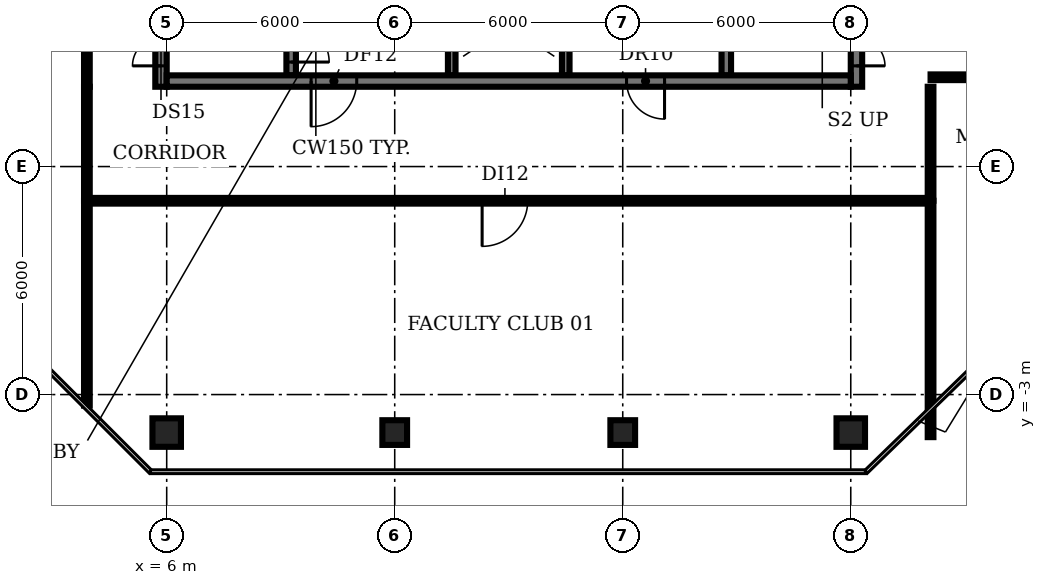
"""IFC4 building model, lengths in metres.
Left out: names, types, materials, properties, quantities, classifications, styles, units other than length and angle.
Written with IfcOpenShell. Run it as: python <this file> out.ifc"""

import sys

from ifc_helpers import new_model, si_unit, direction, frame, frame_2d, origin, origin_2d, place, context, subcontext, project, spatial, rectangle, circle, extrude, element, fill, save


model = new_model("IFC4")
c1 = context("Model", 3, precision=1e-05, world=origin(), true_north=direction((0.0, 1.0)))
c2 = subcontext(c1, "Body", "Model", "MODEL_VIEW")
j1 = project(units=[si_unit("LENGTHUNIT", "METRE"), si_unit("PLANEANGLEUNIT", "RADIAN")], contexts=[c1])
p1 = place(None, origin())
s1 = spatial("IfcSite", under=j1, at=p1, CompositionType="ELEMENT")
p2 = place(p1, origin())
s2 = spatial("IfcBuilding", under=s1, at=p2, CompositionType="ELEMENT")
p3 = place(p2, frame((0.0, 0.0, 314.6)))
s3 = spatial("IfcBuildingStorey", under=s2, at=p3, CompositionType="ELEMENT", Elevation=314.6)
p4 = place(p3, frame((6.0, -4.0, 0.0), z_axis=(0.0, 0.0, 1.0), x_axis=(1.0, 0.0, 0.0)))
e1 = element("IfcColumn", 1, at=p4, inside=s3, PredefinedType="COLUMN", context=c2, shape_type="SweptSolid", body=[
    extrude(circle(Radius=0.375, at=origin_2d()), origin(), (0.0, 0.0, 1.0), 3.9),
])
for number, where, z_axis, x_axis in (
    (2, (12.0, -4.0, 0.0), (0.0, 0.0, 1.0), (1.0, 0.0, 0.0)),
    (3, (18.0, -4.0, 0.0), (0.0, 0.0, 1.0), (1.0, 0.0, 0.0)),
):
    element("IfcColumn", number, at=place(p3, frame(where, z_axis=z_axis, x_axis=x_axis)), inside=s3, PredefinedType="COLUMN", context=c2, shape_type="SweptSolid", body=[
        extrude(rectangle(XDim=0.65, YDim=0.65, at=origin_2d()), origin(), (0.0, 0.0, 1.0), 3.9),
    ])
p5 = place(p3, frame((24.0, -4.0, 0.0), z_axis=(0.0, 0.0, 1.0), x_axis=(1.0, 0.0, 0.0)))
e4 = element("IfcColumn", 4, at=p5, inside=s3, PredefinedType="COLUMN", context=c2, shape_type="SweptSolid", body=[
    extrude(circle(Radius=0.375, at=origin_2d()), origin(), (0.0, 0.0, 1.0), 3.9),
])
p6 = place(p3, frame((9.275, 11.825, 0.0), z_axis=(0.0, 0.0, 1.0), x_axis=(0.0, -1.0, 0.0)))
e5 = element("IfcWall", 5, at=p6, inside=s3, PredefinedType="SHEAR", context=c2, shape_type="SweptSolid", body=[
    extrude(rectangle(XDim=6.425, YDim=0.25, at=frame_2d((3.212, 0.0))), origin(), (0.0, 0.0, 1.0), 3.9),
])
p7 = place(p6, frame((5.075, 0.0, 0.0)))
e6 = element("IfcOpeningElement", 6, at=p7, cuts=e5, PredefinedType="OPENING", context=c2, shape_type="SweptSolid", body=[
    extrude(rectangle(XDim=1.0, YDim=2.1, at=frame_2d((0.5, 1.05))), frame((0.0, 0.135, 0.0), z_axis=(0.0, -1.0, 0.0), x_axis=(1.0, 0.0, 0.0)), (0.0, 0.0, 1.0), 0.27),
])
p8 = place(p3, frame((13.5, 5.4, 0.0), z_axis=(0.0, 0.0, 1.0), x_axis=(0.0, 1.0, 0.0)))
e7 = element("IfcWall", 7, at=p8, inside=s3, PredefinedType="SHEAR", context=c2, shape_type="SweptSolid", body=[
    extrude(rectangle(XDim=8.2, YDim=0.2, at=frame_2d((4.1, 0.0))), origin(), (0.0, 0.0, 1.0), 3.9),
])
p9 = place(p8, frame((0.75, 0.0, 0.0)))
e8 = element("IfcOpeningElement", 8, at=p9, cuts=e7, PredefinedType="OPENING", context=c2, shape_type="SweptSolid", body=[
    extrude(rectangle(XDim=1.1, YDim=2.1, at=frame_2d((0.55, 1.05))), frame((0.0, 0.11, 0.0), z_axis=(0.0, -1.0, 0.0), x_axis=(1.0, 0.0, 0.0)), (0.0, 0.0, 1.0), 0.22),
])
p10 = place(p8, frame((3.55, 0.0, 0.0)))
e9 = element("IfcOpeningElement", 9, at=p10, cuts=e7, PredefinedType="OPENING", context=c2, shape_type="SweptSolid", body=[
    extrude(rectangle(XDim=1.1, YDim=2.1, at=frame_2d((0.55, 1.05))), frame((0.0, 0.11, 0.0), z_axis=(0.0, -1.0, 0.0), x_axis=(1.0, 0.0, 0.0)), (0.0, 0.0, 1.0), 0.22),
])
p11 = place(p8, frame((6.35, 0.0, 0.0)))
e10 = element("IfcOpeningElement", 10, at=p11, cuts=e7, PredefinedType="OPENING", context=c2, shape_type="SweptSolid", body=[
    extrude(rectangle(XDim=1.1, YDim=2.1, at=frame_2d((0.55, 1.05))), frame((0.0, 0.11, 0.0), z_axis=(0.0, -1.0, 0.0), x_axis=(1.0, 0.0, 0.0)), (0.0, 0.0, 1.0), 0.22),
])
p12 = place(p3, frame((16.5, 5.4, 0.0), z_axis=(0.0, 0.0, 1.0), x_axis=(0.0, 1.0, 0.0)))
e11 = element("IfcWall", 11, at=p12, inside=s3, PredefinedType="SHEAR", context=c2, shape_type="SweptSolid", body=[
    extrude(rectangle(XDim=8.2, YDim=0.2, at=frame_2d((4.1, 0.0))), origin(), (0.0, 0.0, 1.0), 3.9),
])
p13 = place(p3, frame((20.725, 5.4, 0.0), z_axis=(0.0, 0.0, 1.0), x_axis=(0.0, 1.0, 0.0)))
e12 = element("IfcWall", 12, at=p13, inside=s3, PredefinedType="SHEAR", context=c2, shape_type="SweptSolid", body=[
    extrude(rectangle(XDim=6.3, YDim=0.25, at=frame_2d((3.15, 0.0))), origin(), (0.0, 0.0, 1.0), 3.9),
])
p14 = place(p3, frame((5.85, 5.1, 0.0), z_axis=(0.0, 0.0, 1.0), x_axis=(0.0, 1.0, 0.0)))
e13 = element("IfcWall", 13, at=p14, inside=s3, PredefinedType="SHEAR", context=c2, shape_type="SweptSolid", body=[
    extrude(rectangle(XDim=20.0, YDim=0.3, at=frame_2d((10.0, 0.0))), origin(), (0.0, 0.0, 1.0), 3.9),
])
p15 = place(p14, frame((0.55, 0.0, 0.0)))
e14 = element("IfcOpeningElement", 14, at=p15, cuts=e13, PredefinedType="OPENING", context=c2, shape_type="SweptSolid", body=[
    extrude(rectangle(XDim=1.5, YDim=2.1, at=frame_2d((0.75, 1.05))), frame((0.0, 0.16, 0.0), z_axis=(0.0, -1.0, 0.0), x_axis=(1.0, 0.0, 0.0)), (0.0, 0.0, 1.0), 0.32),
])
p16 = place(p14, frame((7.0, 0.0, 0.0)))
e15 = element("IfcOpeningElement", 15, at=p16, cuts=e13, PredefinedType="OPENING", context=c2, shape_type="SweptSolid", body=[
    extrude(rectangle(XDim=1.2, YDim=2.1, at=frame_2d((0.6, 1.05))), frame((0.0, 0.16, 0.0), z_axis=(0.0, -1.0, 0.0), x_axis=(1.0, 0.0, 0.0)), (0.0, 0.0, 1.0), 0.32),
])
p17 = place(p14, frame((13.55, 0.0, 0.0)))
e16 = element("IfcOpeningElement", 16, at=p17, cuts=e13, PredefinedType="OPENING", context=c2, shape_type="SweptSolid", body=[
    extrude(rectangle(XDim=1.2, YDim=2.1, at=frame_2d((0.6, 1.05))), frame((0.0, 0.16, 0.0), z_axis=(0.0, -1.0, 0.0), x_axis=(1.0, 0.0, 0.0)), (0.0, 0.0, 1.0), 0.32),
])
p18 = place(p3, frame((24.15, 25.705, 0.0), z_axis=(0.0, 0.0, 1.0), x_axis=(0.0, -1.0, 0.0)))
e17 = element("IfcWall", 17, at=p18, inside=s3, PredefinedType="SHEAR", context=c2, shape_type="SweptSolid", body=[
    extrude(rectangle(XDim=20.605, YDim=0.3, at=frame_2d((10.302, 0.0))), origin(), (0.0, 0.0, 1.0), 3.9),
])
p19 = place(p18, frame((18.555, 0.0, 0.0)))
e18 = element("IfcOpeningElement", 18, at=p19, cuts=e17, PredefinedType="OPENING", context=c2, shape_type="SweptSolid", body=[
    extrude(rectangle(XDim=1.5, YDim=2.1, at=frame_2d((0.75, 1.05))), frame((0.0, 0.16, 0.0), z_axis=(0.0, -1.0, 0.0), x_axis=(1.0, 0.0, 0.0)), (0.0, 0.0, 1.0), 0.32),
])
p20 = place(p18, frame((12.455, 0.0, 0.0)))
e19 = element("IfcOpeningElement", 19, at=p20, cuts=e17, PredefinedType="OPENING", context=c2, shape_type="SweptSolid", body=[
    extrude(rectangle(XDim=0.9, YDim=2.1, at=frame_2d((0.45, 1.05))), frame((0.0, 0.16, 0.0), z_axis=(0.0, -1.0, 0.0), x_axis=(1.0, 0.0, 0.0)), (0.0, 0.0, 1.0), 0.32),
])
p21 = place(p18, frame((6.455, 0.0, 0.0)))
e20 = element("IfcOpeningElement", 20, at=p21, cuts=e17, PredefinedType="OPENING", context=c2, shape_type="SweptSolid", body=[
    extrude(rectangle(XDim=2.0, YDim=2.1, at=frame_2d((1.0, 1.05))), frame((0.0, 0.16, 0.0), z_axis=(0.0, -1.0, 0.0), x_axis=(1.0, 0.0, 0.0)), (0.0, 0.0, 1.0), 0.32),
])
p22 = place(p3, frame((24.0, 5.25, 0.0), z_axis=(0.0, 0.0, 1.0), x_axis=(-1.0, 0.0, 0.0)))
e21 = element("IfcWall", 21, at=p22, inside=s3, PredefinedType="SHEAR", context=c2, shape_type="SweptSolid", body=[
    extrude(rectangle(XDim=18.0, YDim=0.3, at=frame_2d((9.0, 0.0))), origin(), (0.0, 0.0, 1.0), 3.9),
])
p23 = place(p22, frame((13.0, 0.0, 0.0)))
e22 = element("IfcOpeningElement", 22, at=p23, cuts=e21, PredefinedType="OPENING", context=c2, shape_type="SweptSolid", body=[
    extrude(rectangle(XDim=1.2, YDim=2.1, at=frame_2d((0.6, 1.05))), frame((0.0, 0.16, 0.0), z_axis=(0.0, -1.0, 0.0), x_axis=(1.0, 0.0, 0.0)), (0.0, 0.0, 1.0), 0.32),
])
p24 = place(p22, frame((4.9, 0.0, 0.0)))
e23 = element("IfcOpeningElement", 23, at=p24, cuts=e21, PredefinedType="OPENING", context=c2, shape_type="SweptSolid", body=[
    extrude(rectangle(XDim=1.0, YDim=2.1, at=frame_2d((0.5, 1.05))), frame((0.0, 0.16, 0.0), z_axis=(0.0, -1.0, 0.0), x_axis=(1.0, 0.0, 0.0)), (0.0, 0.0, 1.0), 0.32),
])
p25 = place(p3, frame((3.9, -3.29, 0.0), z_axis=(0.0, 0.0, 1.0), x_axis=(0.0, 1.0, 0.0)))
e24 = element("IfcWall", 24, at=p25, inside=s3, PredefinedType="PARTITIONING", context=c2, shape_type="SweptSolid", body=[
    extrude(rectangle(XDim=5.39, YDim=0.15, at=frame_2d((2.695, 0.0))), origin(), (0.0, 0.0, 1.0), 2.95),
])
p26 = place(p3, frame((3.9, 2.1, 0.0), z_axis=(0.0, 0.0, 1.0), x_axis=(0.0, 1.0, 0.0)))
e25 = element("IfcWall", 25, at=p26, inside=s3, PredefinedType="PARTITIONING", context=c2, shape_type="SweptSolid", body=[
    extrude(rectangle(XDim=3.0, YDim=0.15, at=frame_2d((1.5, 0.0))), origin(), (0.0, 0.0, 1.0), 2.95),
])
p27 = place(p3, frame((3.9, 5.1, 0.0), z_axis=(0.0, 0.0, 1.0), x_axis=(0.0, 1.0, 0.0)))
e26 = element("IfcWall", 26, at=p27, inside=s3, PredefinedType="PARTITIONING", context=c2, shape_type="SweptSolid", body=[
    extrude(rectangle(XDim=13.9, YDim=0.15, at=frame_2d((6.95, 0.0))), origin(), (0.0, 0.0, 1.0), 2.95),
])
p28 = place(p27, frame((6.2, 0.0, 0.0)))
e27 = element("IfcOpeningElement", 27, at=p28, cuts=e26, PredefinedType="OPENING", context=c2, shape_type="SweptSolid", body=[
    extrude(rectangle(XDim=1.2, YDim=2.1, at=frame_2d((0.6, 1.05))), frame((0.0, 0.085, 0.0), z_axis=(0.0, -1.0, 0.0), x_axis=(1.0, 0.0, 0.0)), (0.0, 0.0, 1.0), 0.17),
])
p29 = place(p3, frame((26.1, -4.12, 0.0), z_axis=(0.0, 0.0, 1.0), x_axis=(0.0, 1.0, 0.0)))
e28 = element("IfcWall", 28, at=p29, inside=s3, PredefinedType="PARTITIONING", context=c2, shape_type="SweptSolid", body=[
    extrude(rectangle(XDim=6.22, YDim=0.15, at=frame_2d((3.11, 0.0))), origin(), (0.0, 0.0, 1.0), 2.95),
])
p30 = place(p3, frame((26.1, 2.1, 0.0), z_axis=(0.0, 0.0, 1.0), x_axis=(-1.0, 0.0, 0.0)))
e29 = element("IfcWall", 29, at=p30, inside=s3, PredefinedType="PARTITIONING", context=c2, shape_type="SweptSolid", body=[
    extrude(rectangle(XDim=22.2, YDim=0.15, at=frame_2d((11.1, 0.0))), origin(), (0.0, 0.0, 1.0), 2.95),
])
p31 = place(p30, frame((10.6, 0.0, 0.0)))
e30 = element("IfcOpeningElement", 30, at=p31, cuts=e29, PredefinedType="OPENING", context=c2, shape_type="SweptSolid", body=[
    extrude(rectangle(XDim=1.2, YDim=2.1, at=frame_2d((0.6, 1.05))), frame((0.0, 0.085, 0.0), z_axis=(0.0, -1.0, 0.0), x_axis=(1.0, 0.0, 0.0)), (0.0, 0.0, 1.0), 0.17),
])
p32 = place(p3, frame((26.1, 2.1, 0.0), z_axis=(0.0, 0.0, 1.0), x_axis=(0.0, 1.0, 0.0)))
e31 = element("IfcWall", 31, at=p32, inside=s3, PredefinedType="PARTITIONING", context=c2, shape_type="SweptSolid", body=[
    extrude(rectangle(XDim=3.0, YDim=0.15, at=frame_2d((1.5, 0.0))), origin(), (0.0, 0.0, 1.0), 2.95),
])
p33 = place(p3, frame((32.39, 5.35, 0.0), z_axis=(0.0, 0.0, 1.0), x_axis=(-1.0, 0.0, 0.0)))
e32 = element("IfcWall", 32, at=p33, inside=s3, PredefinedType="PARTITIONING", context=c2, shape_type="SweptSolid", body=[
    extrude(rectangle(XDim=6.29, YDim=0.15, at=frame_2d((3.145, 0.0))), origin(), (0.0, 0.0, 1.0), 2.95),
])
p34 = place(p33, frame((3.59, 0.0, 0.0)))
e33 = element("IfcOpeningElement", 33, at=p34, cuts=e32, PredefinedType="OPENING", context=c2, shape_type="SweptSolid", body=[
    extrude(rectangle(XDim=1.0, YDim=2.1, at=frame_2d((0.5, 1.05))), frame((0.0, 0.085, 0.0), z_axis=(0.0, -1.0, 0.0), x_axis=(1.0, 0.0, 0.0)), (0.0, 0.0, 1.0), 0.17),
])
p35 = place(p7, origin())
e34 = element("IfcDoor", 34, at=p35, inside=s3, OperationType="SINGLE_SWING_RIGHT", PredefinedType="DOOR", context=c2, shape_type="SweptSolid", body=[
    extrude(rectangle(XDim=1.0, YDim=2.1, at=frame_2d((0.5, 1.05))), frame((0.0, 0.025, 0.0), z_axis=(0.0, -1.0, 0.0), x_axis=(1.0, 0.0, 0.0)), (0.0, 0.0, 1.0), 0.05),
])
fill(e6, e34)
p36 = place(p15, origin())
e35 = element("IfcDoor", 35, at=p36, inside=s3, OperationType="DOUBLE_DOOR_SINGLE_SWING", PredefinedType="DOOR", context=c2, shape_type="SweptSolid", body=[
    extrude(rectangle(XDim=1.5, YDim=2.1, at=frame_2d((0.75, 1.05))), frame((0.0, 0.025, 0.0), z_axis=(0.0, -1.0, 0.0), x_axis=(1.0, 0.0, 0.0)), (0.0, 0.0, 1.0), 0.05),
])
fill(e14, e35)
p37 = place(p19, origin())
e36 = element("IfcDoor", 36, at=p37, inside=s3, OperationType="DOUBLE_DOOR_SINGLE_SWING", PredefinedType="DOOR", context=c2, shape_type="SweptSolid", body=[
    extrude(rectangle(XDim=1.5, YDim=2.1, at=frame_2d((0.75, 1.05))), frame((0.0, 0.025, 0.0), z_axis=(0.0, -1.0, 0.0), x_axis=(1.0, 0.0, 0.0)), (0.0, 0.0, 1.0), 0.05),
])
fill(e18, e36)
p38 = place(p23, origin())
e37 = element("IfcDoor", 37, at=p38, inside=s3, OperationType="SINGLE_SWING_RIGHT", PredefinedType="DOOR", context=c2, shape_type="SweptSolid", body=[
    extrude(rectangle(XDim=1.2, YDim=2.1, at=frame_2d((0.6, 1.05))), frame((0.0, 0.025, 0.0), z_axis=(0.0, -1.0, 0.0), x_axis=(1.0, 0.0, 0.0)), (0.0, 0.0, 1.0), 0.05),
])
fill(e22, e37)
p39 = place(p24, origin())
e38 = element("IfcDoor", 38, at=p39, inside=s3, OperationType="SINGLE_SWING_LEFT", PredefinedType="DOOR", context=c2, shape_type="SweptSolid", body=[
    extrude(rectangle(XDim=1.0, YDim=2.1, at=frame_2d((0.5, 1.05))), frame((0.0, 0.025, 0.0), z_axis=(0.0, -1.0, 0.0), x_axis=(1.0, 0.0, 0.0)), (0.0, 0.0, 1.0), 0.05),
])
fill(e23, e38)
p40 = place(p31, origin())
e39 = element("IfcDoor", 39, at=p40, inside=s3, OperationType="SINGLE_SWING_RIGHT", PredefinedType="DOOR", context=c2, shape_type="SweptSolid", body=[
    extrude(rectangle(XDim=1.2, YDim=2.1, at=frame_2d((0.6, 1.05))), frame((0.0, 0.025, 0.0), z_axis=(0.0, -1.0, 0.0), x_axis=(1.0, 0.0, 0.0)), (0.0, 0.0, 1.0), 0.05),
])
fill(e30, e39)
save(model, sys.argv[1])
